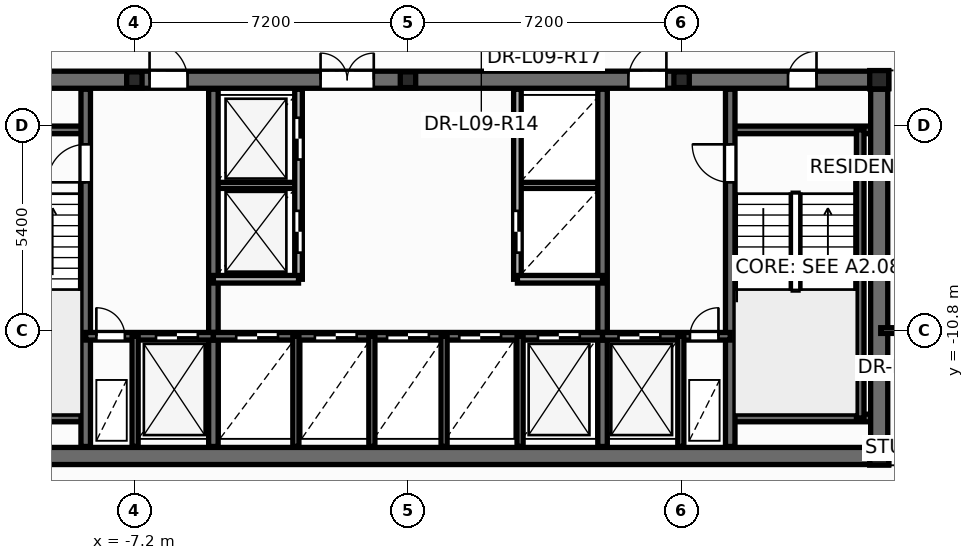
"""IFC4 building model, lengths in metres.
Left out: names, types, materials, properties, quantities, classifications, styles, units other than length and angle.
Written with IfcOpenShell. Run it as: python <this file> out.ifc"""

import sys

from ifc_helpers import new_model, si_unit, direction, frame, frame_2d, origin, origin_2d, place, context, subcontext, project, spatial, rectangle, i_section, extrude, element, fill, save


model = new_model("IFC4")
c1 = context("Model", 3, precision=1e-05, world=origin(), true_north=direction((0.0, 1.0)))
c2 = subcontext(c1, "Body", "Model", "MODEL_VIEW")
j1 = project(units=[si_unit("LENGTHUNIT", "METRE"), si_unit("PLANEANGLEUNIT", "RADIAN")], contexts=[c1])
p1 = place(None, origin())
s1 = spatial("IfcSite", under=j1, at=p1, CompositionType="ELEMENT")
p2 = place(p1, origin())
s2 = spatial("IfcBuilding", under=s1, at=p2, CompositionType="ELEMENT")
p3 = place(p2, frame((0.0, 0.0, 38.7)))
s3 = spatial("IfcBuildingStorey", under=s2, at=p3, CompositionType="ELEMENT", Elevation=38.7)
for number, where, z_axis, x_axis in (
    (1, (12.4, -14.1, 0.0), (0.0, 0.0, 1.0), (1.0, 0.0, 0.0)),
    (2, (12.4, -4.2, 0.0), (0.0, 0.0, 1.0), (1.0, 0.0, 0.0)),
):
    element("IfcColumn", number, at=place(p3, frame(where, z_axis=z_axis, x_axis=x_axis)), inside=s3, PredefinedType="COLUMN", context=c2, shape_type="SweptSolid", body=[
        extrude(i_section(OverallWidth=0.5, OverallDepth=0.482, WebThickness=0.04, FlangeThickness=0.045, at=origin_2d()), origin(), (0.0, 0.0, 1.0), 3.6),
    ])
for number, where, z_axis, x_axis in (
    (3, (-7.2, -4.2, 0.0), (0.0, 0.0, 1.0), (1.0, 0.0, 0.0)),
    (4, (0.0, -4.2, 0.0), (0.0, 0.0, 1.0), (1.0, 0.0, 0.0)),
    (5, (7.2, -4.2, 0.0), (0.0, 0.0, 1.0), (1.0, 0.0, 0.0)),
):
    element("IfcColumn", number, at=place(p3, frame(where, z_axis=z_axis, x_axis=x_axis)), inside=s3, PredefinedType="PILASTER", context=c2, shape_type="SweptSolid", body=[
        extrude(i_section(OverallWidth=0.405, OverallDepth=0.414, WebThickness=0.022, FlangeThickness=0.032, at=origin_2d()), origin(), (0.0, 0.0, 1.0), 3.6),
    ])
for number, where, z_axis, x_axis in (
    (6, (-5.12, -6.98, 0.0), (0.0, 0.0, 1.0), (1.0, 0.0, 0.0)),
    (7, (2.88, -6.98, 0.0), (0.0, 0.0, 1.0), (1.0, 0.0, 0.0)),
):
    element("IfcWall", number, at=place(p3, frame(where, z_axis=z_axis, x_axis=x_axis)), inside=s3, PredefinedType="PARTITIONING", context=c2, shape_type="SweptSolid", body=[
        extrude(rectangle(XDim=2.24, YDim=0.16, at=frame_2d((1.12, 0.0))), origin(), (0.0, 0.0, 1.0), 3.35),
    ])
p4 = place(p3, frame((-12.65, -14.1, 0.0), z_axis=(0.0, 0.0, 1.0), x_axis=(1.0, 0.0, 0.0)))
e8 = element("IfcWall", 8, at=p4, inside=s3, PredefinedType="SHEAR", context=c2, shape_type="SweptSolid", body=[
    extrude(rectangle(XDim=25.3, YDim=0.45, at=frame_2d((12.65, 0.0))), origin(), (0.0, 0.0, 1.0), 3.6),
])
p5 = place(p3, frame((-12.65, -4.2, 0.0), z_axis=(0.0, 0.0, 1.0), x_axis=(1.0, 0.0, 0.0)))
e9 = element("IfcWall", 9, at=p5, inside=s3, PredefinedType="SHEAR", context=c2, shape_type="SweptSolid", body=[
    extrude(rectangle(XDim=25.3, YDim=0.45, at=frame_2d((12.65, 0.0))), origin(), (0.0, 0.0, 1.0), 3.6),
])
p6 = place(p5, frame((1.85, 0.0, 0.0)))
e10 = element("IfcOpeningElement", 10, at=p6, cuts=e9, PredefinedType="OPENING", context=c2, shape_type="SweptSolid", body=[
    extrude(rectangle(XDim=0.756, YDim=2.054, at=frame_2d((0.375, 1.027))), frame((0.0, 0.235, 0.0), z_axis=(0.0, -1.0, 0.0), x_axis=(1.0, 0.0, 0.0)), (0.0, 0.0, 1.0), 0.47),
])
p7 = place(p5, frame((22.65, 0.0, 0.0)))
e11 = element("IfcOpeningElement", 11, at=p7, cuts=e9, PredefinedType="OPENING", context=c2, shape_type="SweptSolid", body=[
    extrude(rectangle(XDim=0.756, YDim=2.054, at=frame_2d((0.375, 1.027))), frame((0.0, 0.235, 0.0), z_axis=(0.0, -1.0, 0.0), x_axis=(1.0, 0.0, 0.0)), (0.0, 0.0, 1.0), 0.47),
])
p8 = place(p5, frame((5.85, 0.0, 0.0)))
e12 = element("IfcOpeningElement", 12, at=p8, cuts=e9, PredefinedType="OPENING", context=c2, shape_type="SweptSolid", body=[
    extrude(rectangle(XDim=1.006, YDim=2.104, at=frame_2d((0.5, 1.052))), frame((0.0, 0.235, 0.0), z_axis=(0.0, -1.0, 0.0), x_axis=(1.0, 0.0, 0.0)), (0.0, 0.0, 1.0), 0.47),
])
p9 = place(p5, frame((10.35, 0.0, 0.0)))
e13 = element("IfcOpeningElement", 13, at=p9, cuts=e9, PredefinedType="OPENING", context=c2, shape_type="SweptSolid", body=[
    extrude(rectangle(XDim=1.406, YDim=2.154, at=frame_2d((0.7, 1.077))), frame((0.0, 0.235, 0.0), z_axis=(0.0, -1.0, 0.0), x_axis=(1.0, 0.0, 0.0)), (0.0, 0.0, 1.0), 0.47),
])
p10 = place(p5, frame((18.45, 0.0, 0.0)))
e14 = element("IfcOpeningElement", 14, at=p10, cuts=e9, PredefinedType="OPENING", context=c2, shape_type="SweptSolid", body=[
    extrude(rectangle(XDim=1.006, YDim=2.104, at=frame_2d((0.5, 1.052))), frame((0.0, 0.235, 0.0), z_axis=(0.0, -1.0, 0.0), x_axis=(1.0, 0.0, 0.0)), (0.0, 0.0, 1.0), 0.47),
])
for number, where, z_axis, x_axis in (
    (15, (-12.35, -5.52, 0.0), (0.0, 0.0, 1.0), (1.0, 0.0, 0.0)),
    (16, (-12.35, -13.1, 0.0), (0.0, 0.0, 1.0), (1.0, 0.0, 0.0)),
    (17, (8.48, -5.52, 0.0), (0.0, 0.0, 1.0), (1.0, 0.0, 0.0)),
    (18, (8.48, -13.1, 0.0), (0.0, 0.0, 1.0), (1.0, 0.0, 0.0)),
):
    element("IfcWall", number, at=place(p3, frame(where, z_axis=z_axis, x_axis=x_axis)), inside=s3, PredefinedType="SOLIDWALL", context=c2, shape_type="SweptSolid", body=[
        extrude(rectangle(XDim=3.87, YDim=0.2, at=frame_2d((1.935, 0.0))), origin(), (0.0, 0.0, 1.0), 3.6),
    ])
p11 = place(p3, frame((11.9, -13.1, 0.0), z_axis=(0.0, 0.0, 1.0), x_axis=(0.0, 1.0, 0.0)))
e19 = element("IfcWall", 19, at=p11, inside=s3, PredefinedType="SOLIDWALL", context=c2, shape_type="SweptSolid", body=[
    extrude(rectangle(XDim=7.58, YDim=0.2, at=frame_2d((3.79, 0.0))), origin(), (0.0, 0.0, 1.0), 3.6),
])
p12 = place(p3, frame((-8.48, -13.85, 0.0), z_axis=(0.0, 0.0, 1.0), x_axis=(0.0, 1.0, 0.0)))
e20 = element("IfcWall", 20, at=p12, inside=s3, PredefinedType="SHEAR", context=c2, shape_type="SweptSolid", body=[
    extrude(rectangle(XDim=9.4, YDim=0.25, at=frame_2d((4.7, 0.0))), origin(), (0.0, 0.0, 1.0), 3.6),
])
p13 = place(p12, frame((6.95, 0.0, 0.0)))
e21 = element("IfcOpeningElement", 21, at=p13, cuts=e20, PredefinedType="OPENING", context=c2, shape_type="SweptSolid", body=[
    extrude(rectangle(XDim=1.006, YDim=2.104, at=frame_2d((0.5, 1.052))), frame((0.0, 0.135, 0.0), z_axis=(0.0, -1.0, 0.0), x_axis=(1.0, 0.0, 0.0)), (0.0, 0.0, 1.0), 0.27),
])
p14 = place(p3, frame((8.48, -13.85, 0.0), z_axis=(0.0, 0.0, 1.0), x_axis=(0.0, 1.0, 0.0)))
e22 = element("IfcWall", 22, at=p14, inside=s3, PredefinedType="SHEAR", context=c2, shape_type="SweptSolid", body=[
    extrude(rectangle(XDim=9.4, YDim=0.25, at=frame_2d((4.7, 0.0))), origin(), (0.0, 0.0, 1.0), 3.6),
])
p15 = place(p14, frame((6.95, 0.0, 0.0)))
e23 = element("IfcOpeningElement", 23, at=p15, cuts=e22, PredefinedType="OPENING", context=c2, shape_type="SweptSolid", body=[
    extrude(rectangle(XDim=1.006, YDim=2.104, at=frame_2d((0.5, 1.052))), frame((0.0, 0.135, 0.0), z_axis=(0.0, -1.0, 0.0), x_axis=(1.0, 0.0, 0.0)), (0.0, 0.0, 1.0), 0.27),
])
for number, where, z_axis, x_axis in (
    (24, (-5.12, -13.85, 0.0), (0.0, 0.0, 1.0), (0.0, 1.0, 0.0)),
    (25, (5.12, -13.85, 0.0), (0.0, 0.0, 1.0), (0.0, 1.0, 0.0)),
):
    element("IfcWall", number, at=place(p3, frame(where, z_axis=z_axis, x_axis=x_axis)), inside=s3, PredefinedType="SHEAR", context=c2, shape_type="SweptSolid", body=[
        extrude(rectangle(XDim=9.4, YDim=0.25, at=frame_2d((4.7, 0.0))), origin(), (0.0, 0.0, 1.0), 3.6),
    ])
p16 = place(p3, frame((-8.48, -10.95, 0.0), z_axis=(0.0, 0.0, 1.0), x_axis=(1.0, 0.0, 0.0)))
e26 = element("IfcWall", 26, at=p16, inside=s3, PredefinedType="SOLIDWALL", context=c2, shape_type="SweptSolid", body=[
    extrude(rectangle(XDim=3.36, YDim=0.2, at=frame_2d((1.68, 0.0))), origin(), (0.0, 0.0, 1.0), 3.6),
])
p17 = place(p16, frame((0.28, 0.0, 0.0)))
e27 = element("IfcOpeningElement", 27, at=p17, cuts=e26, PredefinedType="OPENING", context=c2, shape_type="SweptSolid", body=[
    extrude(rectangle(XDim=0.756, YDim=2.054, at=frame_2d((0.375, 1.027))), frame((0.0, 0.11, 0.0), z_axis=(0.0, -1.0, 0.0), x_axis=(1.0, 0.0, 0.0)), (0.0, 0.0, 1.0), 0.22),
])
p18 = place(p16, frame((1.85, 0.0, 0.0)))
e28 = element("IfcOpeningElement", 28, at=p18, cuts=e26, PredefinedType="OPENING", context=c2, shape_type="SweptSolid", body=[
    extrude(rectangle(XDim=1.106, YDim=2.104, at=frame_2d((0.55, 1.052))), frame((0.0, 0.11, 0.0), z_axis=(0.0, -1.0, 0.0), x_axis=(1.0, 0.0, 0.0)), (0.0, 0.0, 1.0), 0.22),
])
p19 = place(p3, frame((-5.12, -10.95, 0.0), z_axis=(0.0, 0.0, 1.0), x_axis=(1.0, 0.0, 0.0)))
e29 = element("IfcWall", 29, at=p19, inside=s3, PredefinedType="SOLIDWALL", context=c2, shape_type="SweptSolid", body=[
    extrude(rectangle(XDim=10.24, YDim=0.2, at=frame_2d((5.12, 0.0))), origin(), (0.0, 0.0, 1.0), 3.6),
])
p20 = place(p19, frame((0.6, 0.0, 0.0)))
e30 = element("IfcOpeningElement", 30, at=p20, cuts=e29, PredefinedType="OPENING", context=c2, shape_type="SweptSolid", body=[
    extrude(rectangle(XDim=1.106, YDim=2.104, at=frame_2d((0.55, 1.052))), frame((0.0, 0.11, 0.0), z_axis=(0.0, -1.0, 0.0), x_axis=(1.0, 0.0, 0.0)), (0.0, 0.0, 1.0), 0.22),
])
p21 = place(p19, frame((2.67, 0.0, 0.0)))
e31 = element("IfcOpeningElement", 31, at=p21, cuts=e29, PredefinedType="OPENING", context=c2, shape_type="SweptSolid", body=[
    extrude(rectangle(XDim=1.106, YDim=2.104, at=frame_2d((0.55, 1.052))), frame((0.0, 0.11, 0.0), z_axis=(0.0, -1.0, 0.0), x_axis=(1.0, 0.0, 0.0)), (0.0, 0.0, 1.0), 0.22),
])
p22 = place(p19, frame((4.57, 0.0, 0.0)))
e32 = element("IfcOpeningElement", 32, at=p22, cuts=e29, PredefinedType="OPENING", context=c2, shape_type="SweptSolid", body=[
    extrude(rectangle(XDim=1.106, YDim=2.104, at=frame_2d((0.55, 1.052))), frame((0.0, 0.11, 0.0), z_axis=(0.0, -1.0, 0.0), x_axis=(1.0, 0.0, 0.0)), (0.0, 0.0, 1.0), 0.22),
])
p23 = place(p19, frame((6.47, 0.0, 0.0)))
e33 = element("IfcOpeningElement", 33, at=p23, cuts=e29, PredefinedType="OPENING", context=c2, shape_type="SweptSolid", body=[
    extrude(rectangle(XDim=1.106, YDim=2.104, at=frame_2d((0.55, 1.052))), frame((0.0, 0.11, 0.0), z_axis=(0.0, -1.0, 0.0), x_axis=(1.0, 0.0, 0.0)), (0.0, 0.0, 1.0), 0.22),
])
p24 = place(p19, frame((8.54, 0.0, 0.0)))
e34 = element("IfcOpeningElement", 34, at=p24, cuts=e29, PredefinedType="OPENING", context=c2, shape_type="SweptSolid", body=[
    extrude(rectangle(XDim=1.106, YDim=2.104, at=frame_2d((0.55, 1.052))), frame((0.0, 0.11, 0.0), z_axis=(0.0, -1.0, 0.0), x_axis=(1.0, 0.0, 0.0)), (0.0, 0.0, 1.0), 0.22),
])
p25 = place(p3, frame((5.12, -10.95, 0.0), z_axis=(0.0, 0.0, 1.0), x_axis=(1.0, 0.0, 0.0)))
e35 = element("IfcWall", 35, at=p25, inside=s3, PredefinedType="SOLIDWALL", context=c2, shape_type="SweptSolid", body=[
    extrude(rectangle(XDim=3.36, YDim=0.2, at=frame_2d((1.68, 0.0))), origin(), (0.0, 0.0, 1.0), 3.6),
])
p26 = place(p25, frame((0.42, 0.0, 0.0)))
e36 = element("IfcOpeningElement", 36, at=p26, cuts=e35, PredefinedType="OPENING", context=c2, shape_type="SweptSolid", body=[
    extrude(rectangle(XDim=1.106, YDim=2.104, at=frame_2d((0.55, 1.052))), frame((0.0, 0.11, 0.0), z_axis=(0.0, -1.0, 0.0), x_axis=(1.0, 0.0, 0.0)), (0.0, 0.0, 1.0), 0.22),
])
p27 = place(p25, frame((2.3, 0.0, 0.0)))
e37 = element("IfcOpeningElement", 37, at=p27, cuts=e35, PredefinedType="OPENING", context=c2, shape_type="SweptSolid", body=[
    extrude(rectangle(XDim=0.756, YDim=2.054, at=frame_2d((0.375, 1.027))), frame((0.0, 0.11, 0.0), z_axis=(0.0, -1.0, 0.0), x_axis=(1.0, 0.0, 0.0)), (0.0, 0.0, 1.0), 0.22),
])
for number, where, z_axis, x_axis in (
    (38, (-7.18, -13.85, 0.0), (0.0, 0.0, 1.0), (0.0, 1.0, 0.0)),
    (39, (7.18, -13.85, 0.0), (0.0, 0.0, 1.0), (0.0, 1.0, 0.0)),
    (40, (-2.95, -13.85, 0.0), (0.0, 0.0, 1.0), (0.0, 1.0, 0.0)),
    (41, (2.95, -13.85, 0.0), (0.0, 0.0, 1.0), (0.0, 1.0, 0.0)),
):
    element("IfcWall", number, at=place(p3, frame(where, z_axis=z_axis, x_axis=x_axis)), inside=s3, PredefinedType="PARTITIONING", context=c2, shape_type="SweptSolid", body=[
        extrude(rectangle(XDim=2.9, YDim=0.16, at=frame_2d((1.45, 0.0))), origin(), (0.0, 0.0, 1.0), 2.375),
    ])
p28 = place(p3, frame((12.4, -13.85, 0.0), z_axis=(0.0, 0.0, 1.0), x_axis=(0.0, 1.0, 0.0)))
e42 = element("IfcWall", 42, at=p28, inside=s3, PredefinedType="SHEAR", context=c2, shape_type="SweptSolid", body=[
    extrude(rectangle(XDim=9.4, YDim=0.45, at=frame_2d((4.7, 0.0))), origin(), (0.0, 0.0, 1.0), 3.6),
])
p29 = place(p3, frame((-2.88, -9.45, 0.0), z_axis=(0.0, 0.0, 1.0), x_axis=(0.0, 1.0, 0.0)))
e43 = element("IfcWall", 43, at=p29, inside=s3, PredefinedType="SOLIDWALL", context=c2, shape_type="SweptSolid", body=[
    extrude(rectangle(XDim=5.0, YDim=0.2, at=frame_2d((2.5, 0.0))), origin(), (0.0, 0.0, 1.0), 3.35),
])
p30 = place(p29, frame((0.7, 0.0, 0.0)))
e44 = element("IfcOpeningElement", 44, at=p30, cuts=e43, PredefinedType="OPENING", context=c2, shape_type="SweptSolid", body=[
    extrude(rectangle(XDim=1.106, YDim=2.104, at=frame_2d((0.55, 1.052))), frame((0.0, 0.11, 0.0), z_axis=(0.0, -1.0, 0.0), x_axis=(1.0, 0.0, 0.0)), (0.0, 0.0, 1.0), 0.22),
])
p31 = place(p29, frame((3.15, 0.0, 0.0)))
e45 = element("IfcOpeningElement", 45, at=p31, cuts=e43, PredefinedType="OPENING", context=c2, shape_type="SweptSolid", body=[
    extrude(rectangle(XDim=1.106, YDim=2.104, at=frame_2d((0.55, 1.052))), frame((0.0, 0.11, 0.0), z_axis=(0.0, -1.0, 0.0), x_axis=(1.0, 0.0, 0.0)), (0.0, 0.0, 1.0), 0.22),
])
p32 = place(p3, frame((-5.12, -9.45, 0.0), z_axis=(0.0, 0.0, 1.0), x_axis=(1.0, 0.0, 0.0)))
e46 = element("IfcWall", 46, at=p32, inside=s3, PredefinedType="SOLIDWALL", context=c2, shape_type="SweptSolid", body=[
    extrude(rectangle(XDim=2.24, YDim=0.2, at=frame_2d((1.12, 0.0))), origin(), (0.0, 0.0, 1.0), 3.35),
])
p33 = place(p3, frame((2.88, -9.45, 0.0), z_axis=(0.0, 0.0, 1.0), x_axis=(0.0, 1.0, 0.0)))
e47 = element("IfcWall", 47, at=p33, inside=s3, PredefinedType="SOLIDWALL", context=c2, shape_type="SweptSolid", body=[
    extrude(rectangle(XDim=5.0, YDim=0.2, at=frame_2d((2.5, 0.0))), origin(), (0.0, 0.0, 1.0), 3.35),
])
p34 = place(p33, frame((0.7, 0.0, 0.0)))
e48 = element("IfcOpeningElement", 48, at=p34, cuts=e47, PredefinedType="OPENING", context=c2, shape_type="SweptSolid", body=[
    extrude(rectangle(XDim=1.106, YDim=2.104, at=frame_2d((0.55, 1.052))), frame((0.0, 0.11, 0.0), z_axis=(0.0, -1.0, 0.0), x_axis=(1.0, 0.0, 0.0)), (0.0, 0.0, 1.0), 0.22),
])
p35 = place(p3, frame((2.88, -9.45, 0.0), z_axis=(0.0, 0.0, 1.0), x_axis=(1.0, 0.0, 0.0)))
e49 = element("IfcWall", 49, at=p35, inside=s3, PredefinedType="SOLIDWALL", context=c2, shape_type="SweptSolid", body=[
    extrude(rectangle(XDim=2.24, YDim=0.2, at=frame_2d((1.12, 0.0))), origin(), (0.0, 0.0, 1.0), 3.35),
])
for number, where, z_axis, x_axis in (
    (50, (-0.95, -13.85, 0.0), (0.0, 0.0, 1.0), (0.0, 1.0, 0.0)),
    (51, (0.95, -13.85, 0.0), (0.0, 0.0, 1.0), (0.0, 1.0, 0.0)),
):
    element("IfcWall", number, at=place(p3, frame(where, z_axis=z_axis, x_axis=x_axis)), inside=s3, PredefinedType="PARTITIONING", context=c2, shape_type="SweptSolid", body=[
        extrude(rectangle(XDim=2.9, YDim=0.16, at=frame_2d((1.45, 0.0))), origin(), (0.0, 0.0, 1.0), 2.375),
    ])
p36 = place(p3, frame((12.44, -10.8, 0.0), z_axis=(0.0, 0.0, 1.0), x_axis=(1.0, 0.0, 0.0)))
e52 = element("IfcWall", 52, at=p36, inside=s3, PredefinedType="PARTITIONING", context=c2, shape_type="SweptSolid", body=[
    extrude(rectangle(XDim=2.2, YDim=0.15, at=frame_2d((1.1, 0.0))), origin(), (0.0, 0.0, 1.0), 2.713),
])
p37 = place(p36, frame((0.456, 0.0, 0.0)))
e53 = element("IfcOpeningElement", 53, at=p37, cuts=e52, PredefinedType="OPENING", context=c2, shape_type="SweptSolid", body=[
    extrude(rectangle(XDim=0.906, YDim=2.104, at=frame_2d((0.45, 1.052))), frame((0.0, 0.085, 0.0), z_axis=(0.0, -1.0, 0.0), x_axis=(1.0, 0.0, 0.0)), (0.0, 0.0, 1.0), 0.17),
])
p38 = place(p30, origin())
e54 = element("IfcDoor", 54, at=p38, inside=s3, OperationType="DOUBLE_DOOR_SLIDING", PredefinedType="DOOR", context=c2, shape_type="SweptSolid", body=[
    extrude(rectangle(XDim=1.1, YDim=2.1, at=frame_2d((0.55, 1.05))), frame((0.0, 0.025, 0.0), z_axis=(0.0, -1.0, 0.0), x_axis=(1.0, 0.0, 0.0)), (0.0, 0.0, 1.0), 0.05),
])
fill(e44, e54)
p39 = place(p31, origin())
e55 = element("IfcDoor", 55, at=p39, inside=s3, OperationType="DOUBLE_DOOR_SLIDING", PredefinedType="DOOR", context=c2, shape_type="SweptSolid", body=[
    extrude(rectangle(XDim=1.1, YDim=2.1, at=frame_2d((0.55, 1.05))), frame((0.0, 0.025, 0.0), z_axis=(0.0, -1.0, 0.0), x_axis=(1.0, 0.0, 0.0)), (0.0, 0.0, 1.0), 0.05),
])
fill(e45, e55)
p40 = place(p34, origin())
e56 = element("IfcDoor", 56, at=p40, inside=s3, OperationType="DOUBLE_DOOR_SLIDING", PredefinedType="DOOR", context=c2, shape_type="SweptSolid", body=[
    extrude(rectangle(XDim=1.1, YDim=2.1, at=frame_2d((0.55, 1.05))), frame((0.0, 0.025, 0.0), z_axis=(0.0, -1.0, 0.0), x_axis=(1.0, 0.0, 0.0)), (0.0, 0.0, 1.0), 0.05),
])
fill(e48, e56)
p41 = place(p13, origin())
e57 = element("IfcDoor", 57, at=p41, inside=s3, OperationType="SINGLE_SWING_LEFT", PredefinedType="DOOR", context=c2, shape_type="SweptSolid", body=[
    extrude(rectangle(XDim=1.0, YDim=2.1, at=frame_2d((0.5, 1.05))), frame((0.0, 0.025, 0.0), z_axis=(0.0, -1.0, 0.0), x_axis=(1.0, 0.0, 0.0)), (0.0, 0.0, 1.0), 0.05),
])
fill(e21, e57)
p42 = place(p15, origin())
e58 = element("IfcDoor", 58, at=p42, inside=s3, OperationType="SINGLE_SWING_RIGHT", PredefinedType="DOOR", context=c2, shape_type="SweptSolid", body=[
    extrude(rectangle(XDim=1.0, YDim=2.1, at=frame_2d((0.5, 1.05))), frame((0.0, 0.025, 0.0), z_axis=(0.0, -1.0, 0.0), x_axis=(1.0, 0.0, 0.0)), (0.0, 0.0, 1.0), 0.05),
])
fill(e23, e58)
p43 = place(p17, origin())
e59 = element("IfcDoor", 59, at=p43, inside=s3, OperationType="SINGLE_SWING_LEFT", PredefinedType="DOOR", context=c2, shape_type="SweptSolid", body=[
    extrude(rectangle(XDim=0.75, YDim=2.05, at=frame_2d((0.375, 1.025))), frame((0.0, 0.025, 0.0), z_axis=(0.0, -1.0, 0.0), x_axis=(1.0, 0.0, 0.0)), (0.0, 0.0, 1.0), 0.05),
])
fill(e27, e59)
p44 = place(p18, origin())
e60 = element("IfcDoor", 60, at=p44, inside=s3, OperationType="DOUBLE_DOOR_SLIDING", PredefinedType="DOOR", context=c2, shape_type="SweptSolid", body=[
    extrude(rectangle(XDim=1.1, YDim=2.1, at=frame_2d((0.55, 1.05))), frame((0.0, 0.025, 0.0), z_axis=(0.0, -1.0, 0.0), x_axis=(1.0, 0.0, 0.0)), (0.0, 0.0, 1.0), 0.05),
])
fill(e28, e60)
p45 = place(p26, origin())
e61 = element("IfcDoor", 61, at=p45, inside=s3, OperationType="DOUBLE_DOOR_SLIDING", PredefinedType="DOOR", context=c2, shape_type="SweptSolid", body=[
    extrude(rectangle(XDim=1.1, YDim=2.1, at=frame_2d((0.55, 1.05))), frame((0.0, 0.025, 0.0), z_axis=(0.0, -1.0, 0.0), x_axis=(1.0, 0.0, 0.0)), (0.0, 0.0, 1.0), 0.05),
])
fill(e36, e61)
p46 = place(p27, origin())
e62 = element("IfcDoor", 62, at=p46, inside=s3, OperationType="SINGLE_SWING_RIGHT", PredefinedType="DOOR", context=c2, shape_type="SweptSolid", body=[
    extrude(rectangle(XDim=0.75, YDim=2.05, at=frame_2d((0.375, 1.025))), frame((0.0, 0.025, 0.0), z_axis=(0.0, -1.0, 0.0), x_axis=(1.0, 0.0, 0.0)), (0.0, 0.0, 1.0), 0.05),
])
fill(e37, e62)
p47 = place(p20, origin())
e63 = element("IfcDoor", 63, at=p47, inside=s3, OperationType="DOUBLE_DOOR_SLIDING", PredefinedType="DOOR", context=c2, shape_type="SweptSolid", body=[
    extrude(rectangle(XDim=1.1, YDim=2.1, at=frame_2d((0.55, 1.05))), frame((0.0, 0.025, 0.0), z_axis=(0.0, -1.0, 0.0), x_axis=(1.0, 0.0, 0.0)), (0.0, 0.0, 1.0), 0.05),
])
fill(e30, e63)
p48 = place(p21, origin())
e64 = element("IfcDoor", 64, at=p48, inside=s3, OperationType="DOUBLE_DOOR_SLIDING", PredefinedType="DOOR", context=c2, shape_type="SweptSolid", body=[
    extrude(rectangle(XDim=1.1, YDim=2.1, at=frame_2d((0.55, 1.05))), frame((0.0, 0.025, 0.0), z_axis=(0.0, -1.0, 0.0), x_axis=(1.0, 0.0, 0.0)), (0.0, 0.0, 1.0), 0.05),
])
fill(e31, e64)
p49 = place(p22, origin())
e65 = element("IfcDoor", 65, at=p49, inside=s3, OperationType="DOUBLE_DOOR_SLIDING", PredefinedType="DOOR", context=c2, shape_type="SweptSolid", body=[
    extrude(rectangle(XDim=1.1, YDim=2.1, at=frame_2d((0.55, 1.05))), frame((0.0, 0.025, 0.0), z_axis=(0.0, -1.0, 0.0), x_axis=(1.0, 0.0, 0.0)), (0.0, 0.0, 1.0), 0.05),
])
fill(e32, e65)
p50 = place(p23, origin())
e66 = element("IfcDoor", 66, at=p50, inside=s3, OperationType="DOUBLE_DOOR_SLIDING", PredefinedType="DOOR", context=c2, shape_type="SweptSolid", body=[
    extrude(rectangle(XDim=1.1, YDim=2.1, at=frame_2d((0.55, 1.05))), frame((0.0, 0.025, 0.0), z_axis=(0.0, -1.0, 0.0), x_axis=(1.0, 0.0, 0.0)), (0.0, 0.0, 1.0), 0.05),
])
fill(e33, e66)
p51 = place(p24, origin())
e67 = element("IfcDoor", 67, at=p51, inside=s3, OperationType="DOUBLE_DOOR_SLIDING", PredefinedType="DOOR", context=c2, shape_type="SweptSolid", body=[
    extrude(rectangle(XDim=1.1, YDim=2.1, at=frame_2d((0.55, 1.05))), frame((0.0, 0.025, 0.0), z_axis=(0.0, -1.0, 0.0), x_axis=(1.0, 0.0, 0.0)), (0.0, 0.0, 1.0), 0.05),
])
fill(e34, e67)
p52 = place(p7, origin())
e68 = element("IfcDoor", 68, at=p52, inside=s3, OperationType="SINGLE_SWING_RIGHT", PredefinedType="DOOR", context=c2, shape_type="SweptSolid", body=[
    extrude(rectangle(XDim=0.75, YDim=2.05, at=frame_2d((0.375, 1.025))), frame((0.0, 0.025, 0.0), z_axis=(0.0, -1.0, 0.0), x_axis=(1.0, 0.0, 0.0)), (0.0, 0.0, 1.0), 0.05),
])
fill(e11, e68)
p53 = place(p8, origin())
e69 = element("IfcDoor", 69, at=p53, inside=s3, OperationType="SINGLE_SWING_LEFT", PredefinedType="DOOR", context=c2, shape_type="SweptSolid", body=[
    extrude(rectangle(XDim=1.0, YDim=2.1, at=frame_2d((0.5, 1.05))), frame((0.0, 0.025, 0.0), z_axis=(0.0, -1.0, 0.0), x_axis=(1.0, 0.0, 0.0)), (0.0, 0.0, 1.0), 0.05),
])
fill(e12, e69)
p54 = place(p9, origin())
e70 = element("IfcDoor", 70, at=p54, inside=s3, OperationType="DOUBLE_DOOR_SINGLE_SWING", PredefinedType="DOOR", context=c2, shape_type="SweptSolid", body=[
    extrude(rectangle(XDim=1.4, YDim=2.15, at=frame_2d((0.7, 1.075))), frame((0.0, 0.025, 0.0), z_axis=(0.0, -1.0, 0.0), x_axis=(1.0, 0.0, 0.0)), (0.0, 0.0, 1.0), 0.05),
])
fill(e13, e70)
p55 = place(p10, origin())
e71 = element("IfcDoor", 71, at=p55, inside=s3, OperationType="SINGLE_SWING_RIGHT", PredefinedType="DOOR", context=c2, shape_type="SweptSolid", body=[
    extrude(rectangle(XDim=1.0, YDim=2.1, at=frame_2d((0.5, 1.05))), frame((0.0, 0.025, 0.0), z_axis=(0.0, -1.0, 0.0), x_axis=(1.0, 0.0, 0.0)), (0.0, 0.0, 1.0), 0.05),
])
fill(e14, e71)
save(model, sys.argv[1])
